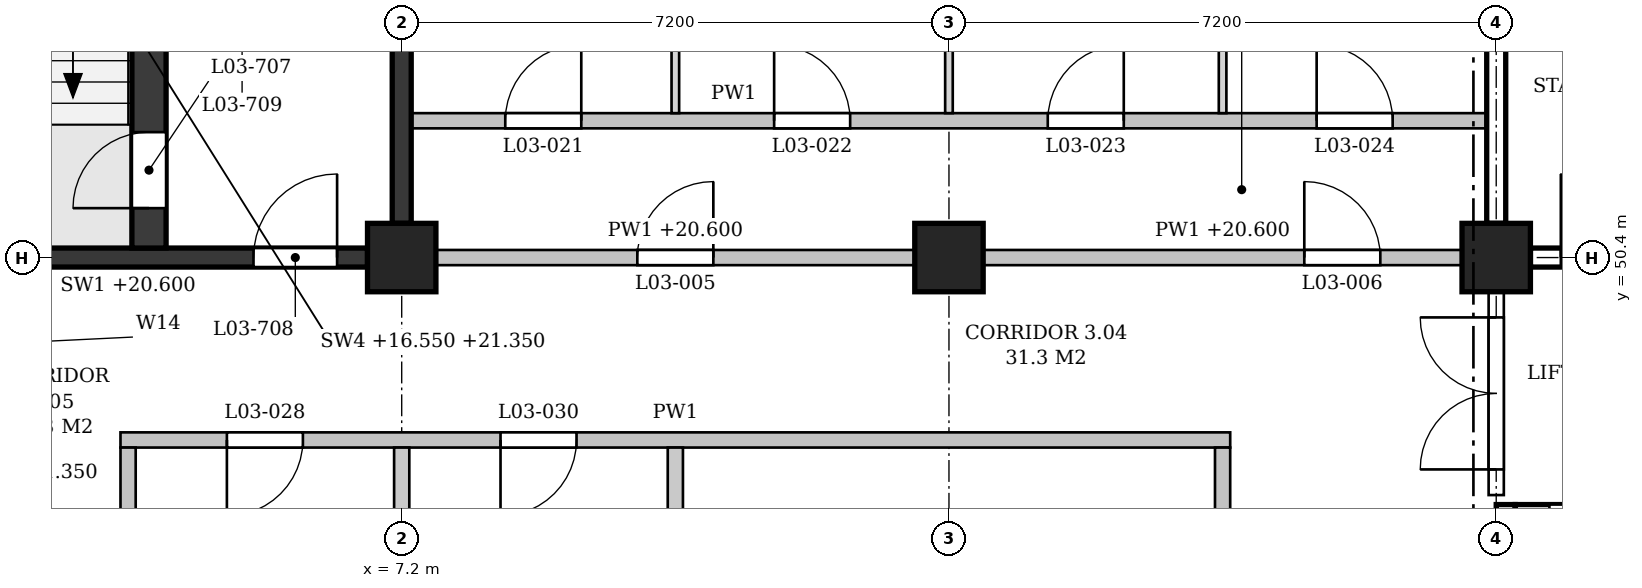
"""IFC4 building model, lengths in metres.
Left out: names, types, materials, properties, quantities, classifications, styles, units other than length and angle.
Written with IfcOpenShell. Run it as: python <this file> out.ifc"""

import sys

from ifc_helpers import new_model, si_unit, direction, frame, frame_2d, origin, origin_2d, place, context, subcontext, project, spatial, polyline, rectangle, outline, extrude, element, fill, save


model = new_model("IFC4")
c1 = context("Model", 3, precision=1e-05, world=origin(), true_north=direction((0.0, 1.0)))
c2 = subcontext(c1, "Body", "Model", "MODEL_VIEW")
j1 = project(units=[si_unit("LENGTHUNIT", "METRE"), si_unit("PLANEANGLEUNIT", "RADIAN")], contexts=[c1])
p1 = place(None, origin())
s1 = spatial("IfcSite", under=j1, at=p1, CompositionType="ELEMENT")
p2 = place(p1, origin())
s2 = spatial("IfcBuilding", under=s1, at=p2, CompositionType="ELEMENT")
p3 = place(p2, frame((0.0, 0.0, 16.8)))
s3 = spatial("IfcBuildingStorey", under=s2, at=p3, CompositionType="ELEMENT", Elevation=16.8)
for number, where, z_axis, x_axis in (
    (1, (7.2, 50.4, 0.0), (0.0, 0.0, 1.0), (1.0, 0.0, 0.0)),
    (2, (14.4, 50.4, 0.0), (0.0, 0.0, 1.0), (1.0, 0.0, 0.0)),
    (3, (21.6, 50.4, 0.0), (0.0, 0.0, 1.0), (1.0, 0.0, 0.0)),
):
    element("IfcColumn", number, at=place(p3, frame(where, z_axis=z_axis, x_axis=x_axis)), inside=s3, PredefinedType="COLUMN", context=c2, shape_type="SweptSolid", body=[
        extrude(rectangle(XDim=0.9, YDim=0.9, at=origin_2d()), origin(), (0.0, 0.0, 1.0), 4.8),
    ])
p4 = place(p3, frame((0.45, 50.4, 0.0), z_axis=(0.0, 0.0, 1.0), x_axis=(1.0, 0.0, 0.0)))
e4 = element("IfcWall", 4, at=p4, inside=s3, PredefinedType="SHEAR", context=c2, shape_type="SweptSolid", body=[
    extrude(rectangle(XDim=6.3, YDim=0.25, at=frame_2d((3.15, 0.0))), origin(), (0.0, 0.0, 1.0), 3.8),
])
p5 = place(p4, frame((4.8, 0.0, 0.0)))
e5 = element("IfcOpeningElement", 5, at=p5, cuts=e4, PredefinedType="OPENING", context=c2, shape_type="SweptSolid", body=[
    extrude(rectangle(XDim=1.1, YDim=2.1, at=frame_2d((0.55, 1.05))), frame((0.0, 0.135, 0.0), z_axis=(0.0, -1.0, 0.0), x_axis=(1.0, 0.0, 0.0)), (0.0, 0.0, 1.0), 0.27),
])
p6 = place(p3, frame((7.2, 50.85, 0.0), z_axis=(0.0, 0.0, 1.0), x_axis=(0.0, 1.0, 0.0)))
e6 = element("IfcWall", 6, at=p6, inside=s3, PredefinedType="SHEAR", context=c2, shape_type="SweptSolid", body=[
    extrude(rectangle(XDim=6.3, YDim=0.25, at=frame_2d((3.15, 0.0))), origin(), (0.0, 0.0, 1.0), 3.8),
])
p7 = place(p3, frame((3.875, 50.525, 0.0), z_axis=(0.0, 0.0, 1.0), x_axis=(0.0, 1.0, 0.0)))
e7 = element("IfcWall", 7, at=p7, inside=s3, PredefinedType="SHEAR", context=c2, shape_type="SweptSolid", body=[
    extrude(rectangle(XDim=6.85, YDim=0.45, at=frame_2d((3.425, 0.0))), origin(), (0.0, 0.0, 1.0), 4.55),
])
p8 = place(p7, frame((0.525, 0.0, 0.0)))
e8 = element("IfcOpeningElement", 8, at=p8, cuts=e7, PredefinedType="OPENING", context=c2, shape_type="SweptSolid", body=[
    extrude(rectangle(XDim=1.0, YDim=2.1, at=frame_2d((0.5, 1.05))), frame((0.0, 0.235, 0.0), z_axis=(0.0, -1.0, 0.0), x_axis=(1.0, 0.0, 0.0)), (0.0, 0.0, 1.0), 0.47),
])
p9 = place(p3, frame((22.05, 50.4, 0.0), z_axis=(0.0, 0.0, 1.0), x_axis=(1.0, 0.0, 0.0)))
e9 = element("IfcWall", 9, at=p9, inside=s3, PredefinedType="SHEAR", context=c2, shape_type="SweptSolid", body=[
    extrude(rectangle(XDim=6.3, YDim=0.25, at=frame_2d((3.15, 0.0))), origin(), (0.0, 0.0, 1.0), 3.8),
])
p10 = place(p9, frame((0.4, 0.0, 0.0)))
e10 = element("IfcOpeningElement", 10, at=p10, cuts=e9, PredefinedType="OPENING", context=c2, shape_type="SweptSolid", body=[
    extrude(rectangle(XDim=1.1, YDim=2.1, at=frame_2d((0.55, 1.05))), frame((0.0, 0.135, 0.0), z_axis=(0.0, -1.0, 0.0), x_axis=(1.0, 0.0, 0.0)), (0.0, 0.0, 1.0), 0.27),
])
p11 = place(p3, frame((21.6, 50.85, 0.0), z_axis=(0.0, 0.0, 1.0), x_axis=(0.0, 1.0, 0.0)))
e11 = element("IfcWall", 11, at=p11, inside=s3, PredefinedType="SHEAR", context=c2, shape_type="SweptSolid", body=[
    extrude(rectangle(XDim=6.3, YDim=0.25, at=frame_2d((3.15, 0.0))), origin(), (0.0, 0.0, 1.0), 3.8),
])
p12 = place(p3, frame((21.725, 43.65, -0.25), z_axis=(0.0, 0.0, 1.0), x_axis=(0.0, 1.0, 0.0)))
e12 = element("IfcWall", 12, at=p12, inside=s3, PredefinedType="SHEAR", context=c2, shape_type="SweptSolid", body=[
    extrude(rectangle(XDim=3.5, YDim=0.25, at=frame_2d((1.75, 0.0))), origin(), (0.0, 0.0, 1.0), 4.05),
])
p13 = place(p3, frame((21.85, 47.025, -0.25), z_axis=(0.0, 0.0, 1.0), x_axis=(1.0, 0.0, 0.0)))
e13 = element("IfcWall", 13, at=p13, inside=s3, PredefinedType="SHEAR", context=c2, shape_type="SweptSolid", body=[
    extrude(rectangle(XDim=2.0, YDim=0.25, at=frame_2d((1.0, 0.0))), origin(), (0.0, 0.0, 1.0), 4.8),
])
p14 = place(p13, frame((0.45, 0.0, 0.25)))
e14 = element("IfcOpeningElement", 14, at=p14, cuts=e13, PredefinedType="OPENING", context=c2, shape_type="SweptSolid", body=[
    extrude(rectangle(XDim=1.1, YDim=2.1, at=frame_2d((0.55, 1.05))), frame((0.0, 0.135, 0.0), z_axis=(0.0, -1.0, 0.0), x_axis=(1.0, 0.0, 0.0)), (0.0, 0.0, 1.0), 0.27),
])
p15 = place(p3, frame((3.5, 48.0, 0.0), z_axis=(0.0, 0.0, 1.0), x_axis=(1.0, 0.0, 0.0)))
e15 = element("IfcWall", 15, at=p15, inside=s3, PredefinedType="PARTITIONING", context=c2, shape_type="SweptSolid", body=[
    extrude(outline(polyline([(0.0, 0.0), (14.6, 0.0), (14.6, 4.55), (11.15, 4.55), (11.15, 3.8), (10.65, 3.8), (10.65, 4.55), (3.95, 4.55), (3.95, 3.8), (3.45, 3.8), (3.45, 4.55), (0.0, 4.55), (0.0, 0.0)])), frame((0.0, 0.1, 0.0), z_axis=(0.0, -1.0, 0.0), x_axis=(1.0, 0.0, 0.0)), (0.0, 0.0, 1.0), 0.2),
])
p16 = place(p15, frame((1.4, 0.0, 0.0)))
e16 = element("IfcOpeningElement", 16, at=p16, cuts=e15, PredefinedType="OPENING", context=c2, shape_type="SweptSolid", body=[
    extrude(rectangle(XDim=1.0, YDim=2.1, at=frame_2d((0.5, 1.05))), frame((0.0, 0.11, 0.0), z_axis=(0.0, -1.0, 0.0), x_axis=(1.0, 0.0, 0.0)), (0.0, 0.0, 1.0), 0.22),
])
p17 = place(p15, frame((5.0, 0.0, 0.0)))
e17 = element("IfcOpeningElement", 17, at=p17, cuts=e15, PredefinedType="OPENING", context=c2, shape_type="SweptSolid", body=[
    extrude(rectangle(XDim=1.0, YDim=2.1, at=frame_2d((0.5, 1.05))), frame((0.0, 0.11, 0.0), z_axis=(0.0, -1.0, 0.0), x_axis=(1.0, 0.0, 0.0)), (0.0, 0.0, 1.0), 0.22),
])
p18 = place(p3, frame((7.65, 50.4, 0.0), z_axis=(0.0, 0.0, 1.0), x_axis=(1.0, 0.0, 0.0)))
e18 = element("IfcWall", 18, at=p18, inside=s3, PredefinedType="PARTITIONING", context=c2, shape_type="SweptSolid", body=[
    extrude(rectangle(XDim=6.3, YDim=0.2, at=frame_2d((3.15, 0.0))), origin(), (0.0, 0.0, 1.0), 3.8),
])
p19 = place(p18, frame((2.65, 0.0, 0.0)))
e19 = element("IfcOpeningElement", 19, at=p19, cuts=e18, PredefinedType="OPENING", context=c2, shape_type="SweptSolid", body=[
    extrude(rectangle(XDim=1.0, YDim=2.1, at=frame_2d((0.5, 1.05))), frame((0.0, 0.11, 0.0), z_axis=(0.0, -1.0, 0.0), x_axis=(1.0, 0.0, 0.0)), (0.0, 0.0, 1.0), 0.22),
])
p20 = place(p3, frame((14.85, 50.4, 0.0), z_axis=(0.0, 0.0, 1.0), x_axis=(1.0, 0.0, 0.0)))
e20 = element("IfcWall", 20, at=p20, inside=s3, PredefinedType="PARTITIONING", context=c2, shape_type="SweptSolid", body=[
    extrude(rectangle(XDim=6.3, YDim=0.2, at=frame_2d((3.15, 0.0))), origin(), (0.0, 0.0, 1.0), 3.8),
])
p21 = place(p20, frame((4.225, 0.0, 0.0)))
e21 = element("IfcOpeningElement", 21, at=p21, cuts=e20, PredefinedType="OPENING", context=c2, shape_type="SweptSolid", body=[
    extrude(rectangle(XDim=1.0, YDim=2.1, at=frame_2d((0.5, 1.05))), frame((0.0, 0.11, 0.0), z_axis=(0.0, -1.0, 0.0), x_axis=(1.0, 0.0, 0.0)), (0.0, 0.0, 1.0), 0.22),
])
p22 = place(p3, frame((7.325, 52.2, 0.0), z_axis=(0.0, 0.0, 1.0), x_axis=(1.0, 0.0, 0.0)))
e22 = element("IfcWall", 22, at=p22, inside=s3, PredefinedType="PARTITIONING", context=c2, shape_type="SweptSolid", body=[
    extrude(outline(polyline([(0.0, 0.0), (14.15, 0.0), (14.15, 3.8), (14.025, 3.8), (14.025, 4.55), (7.325, 4.55), (7.325, 3.8), (6.825, 3.8), (6.825, 4.55), (0.125, 4.55), (0.125, 3.8), (0.0, 3.8), (0.0, 0.0)])), frame((0.0, 0.1, 0.0), z_axis=(0.0, -1.0, 0.0), x_axis=(1.0, 0.0, 0.0)), (0.0, 0.0, 1.0), 0.2),
])
p23 = place(p22, frame((1.238, 0.0, 0.0)))
e23 = element("IfcOpeningElement", 23, at=p23, cuts=e22, PredefinedType="OPENING", context=c2, shape_type="SweptSolid", body=[
    extrude(rectangle(XDim=1.0, YDim=2.1, at=frame_2d((0.5, 1.05))), frame((0.0, 0.11, 0.0), z_axis=(0.0, -1.0, 0.0), x_axis=(1.0, 0.0, 0.0)), (0.0, 0.0, 1.0), 0.22),
])
p24 = place(p22, frame((4.775, 0.0, 0.0)))
e24 = element("IfcOpeningElement", 24, at=p24, cuts=e22, PredefinedType="OPENING", context=c2, shape_type="SweptSolid", body=[
    extrude(rectangle(XDim=1.0, YDim=2.1, at=frame_2d((0.5, 1.05))), frame((0.0, 0.11, 0.0), z_axis=(0.0, -1.0, 0.0), x_axis=(1.0, 0.0, 0.0)), (0.0, 0.0, 1.0), 0.22),
])
p25 = place(p22, frame((8.375, 0.0, 0.0)))
e25 = element("IfcOpeningElement", 25, at=p25, cuts=e22, PredefinedType="OPENING", context=c2, shape_type="SweptSolid", body=[
    extrude(rectangle(XDim=1.0, YDim=2.1, at=frame_2d((0.5, 1.05))), frame((0.0, 0.11, 0.0), z_axis=(0.0, -1.0, 0.0), x_axis=(1.0, 0.0, 0.0)), (0.0, 0.0, 1.0), 0.22),
])
p26 = place(p22, frame((11.913, 0.0, 0.0)))
e26 = element("IfcOpeningElement", 26, at=p26, cuts=e22, PredefinedType="OPENING", context=c2, shape_type="SweptSolid", body=[
    extrude(rectangle(XDim=1.0, YDim=2.1, at=frame_2d((0.5, 1.05))), frame((0.0, 0.11, 0.0), z_axis=(0.0, -1.0, 0.0), x_axis=(1.0, 0.0, 0.0)), (0.0, 0.0, 1.0), 0.22),
])
p27 = place(p3, frame((3.6, 46.8, 0.0), z_axis=(0.0, 0.0, 1.0), x_axis=(0.0, 1.0, 0.0)))
e27 = element("IfcWall", 27, at=p27, inside=s3, PredefinedType="PARTITIONING", context=c2, shape_type="SweptSolid", body=[
    extrude(rectangle(XDim=1.1, YDim=0.2, at=frame_2d((0.55, 0.0))), origin(), (0.0, 0.0, 1.0), 4.55),
])
p28 = place(p3, frame((7.2, 43.65, 0.0), z_axis=(0.0, 0.0, 1.0), x_axis=(0.0, 1.0, 0.0)))
e28 = element("IfcWall", 28, at=p28, inside=s3, PredefinedType="PARTITIONING", context=c2, shape_type="SweptSolid", body=[
    extrude(rectangle(XDim=4.25, YDim=0.2, at=frame_2d((2.125, 0.0))), origin(), (0.0, 0.0, 1.0), 3.8),
])
p29 = place(p3, frame((10.8, 36.15, 0.0), z_axis=(0.0, 0.0, 1.0), x_axis=(0.0, 1.0, 0.0)))
e29 = element("IfcWall", 29, at=p29, inside=s3, PredefinedType="PARTITIONING", context=c2, shape_type="SweptSolid", body=[
    extrude(outline(polyline([(0.0, 0.0), (11.75, 0.0), (11.75, 4.55), (7.3, 4.55), (7.3, 3.8), (6.8, 3.8), (6.8, 4.55), (0.1, 4.55), (0.1, 3.95), (0.0, 3.95), (0.0, 0.0)])), frame((0.0, 0.1, 0.0), z_axis=(0.0, -1.0, 0.0), x_axis=(1.0, 0.0, 0.0)), (0.0, 0.0, 1.0), 0.2),
])
p30 = place(p3, frame((10.8, 52.3, 0.0), z_axis=(0.0, 0.0, 1.0), x_axis=(0.0, 1.0, 0.0)))
e30 = element("IfcWall", 30, at=p30, inside=s3, PredefinedType="PARTITIONING", context=c2, shape_type="SweptSolid", body=[
    extrude(rectangle(XDim=5.15, YDim=0.1, at=frame_2d((2.575, 0.0))), origin(), (0.0, 0.0, 1.0), 3.8),
])
p31 = place(p3, frame((14.4, 52.3, 0.0), z_axis=(0.0, 0.0, 1.0), x_axis=(0.0, 1.0, 0.0)))
e31 = element("IfcWall", 31, at=p31, inside=s3, PredefinedType="PARTITIONING", context=c2, shape_type="SweptSolid", body=[
    extrude(rectangle(XDim=4.85, YDim=0.1, at=frame_2d((2.425, 0.0))), origin(), (0.0, 0.0, 1.0), 3.8),
])
p32 = place(p3, frame((18.0, 40.9, 0.0), z_axis=(0.0, 0.0, 1.0), x_axis=(0.0, 1.0, 0.0)))
e32 = element("IfcWall", 32, at=p32, inside=s3, PredefinedType="PARTITIONING", context=c2, shape_type="SweptSolid", body=[
    extrude(outline(polyline([(0.0, 0.0), (7.0, 0.0), (7.0, 4.55), (2.55, 4.55), (2.55, 3.8), (2.05, 3.8), (2.05, 4.55), (0.0, 4.55), (0.0, 0.0)])), frame((0.0, 0.1, 0.0), z_axis=(0.0, -1.0, 0.0), x_axis=(1.0, 0.0, 0.0)), (0.0, 0.0, 1.0), 0.2),
])
p33 = place(p32, frame((3.0, 0.0, 0.0)))
e33 = element("IfcOpeningElement", 33, at=p33, cuts=e32, PredefinedType="OPENING", context=c2, shape_type="SweptSolid", body=[
    extrude(rectangle(XDim=1.0, YDim=2.1, at=frame_2d((0.5, 1.05))), frame((0.0, 0.11, 0.0), z_axis=(0.0, -1.0, 0.0), x_axis=(1.0, 0.0, 0.0)), (0.0, 0.0, 1.0), 0.22),
])
p34 = place(p3, frame((18.0, 52.3, 0.0), z_axis=(0.0, 0.0, 1.0), x_axis=(0.0, 1.0, 0.0)))
e34 = element("IfcWall", 34, at=p34, inside=s3, PredefinedType="PARTITIONING", context=c2, shape_type="SweptSolid", body=[
    extrude(rectangle(XDim=5.15, YDim=0.1, at=frame_2d((2.575, 0.0))), origin(), (0.0, 0.0, 1.0), 3.8),
])
p35 = place(p3, frame((21.6, 47.275, 0.0), z_axis=(0.0, 0.0, 1.0), x_axis=(0.0, 1.0, 0.0)))
e35 = element("IfcWall", 35, at=p35, inside=s3, PredefinedType="PARTITIONING", context=c2, shape_type="SweptSolid", body=[
    extrude(rectangle(XDim=2.675, YDim=0.2, at=frame_2d((1.337, 0.0))), origin(), (0.0, 0.0, 1.0), 3.8),
])
p36 = place(p35, frame((0.337, 0.0, 0.0)))
e36 = element("IfcOpeningElement", 36, at=p36, cuts=e35, PredefinedType="OPENING", context=c2, shape_type="SweptSolid", body=[
    extrude(rectangle(XDim=2.0, YDim=2.4, at=frame_2d((1.0, 1.2))), frame((0.0, 0.11, 0.0), z_axis=(0.0, -1.0, 0.0), x_axis=(1.0, 0.0, 0.0)), (0.0, 0.0, 1.0), 0.22),
])
p37 = place(p8, origin())
e37 = element("IfcDoor", 37, at=p37, inside=s3, OperationType="SINGLE_SWING_LEFT", PredefinedType="DOOR", context=c2, shape_type="SweptSolid", body=[
    extrude(rectangle(XDim=1.0, YDim=2.1, at=frame_2d((0.5, 1.05))), frame((0.0, 0.025, 0.0), z_axis=(0.0, -1.0, 0.0), x_axis=(1.0, 0.0, 0.0)), (0.0, 0.0, 1.0), 0.05),
])
fill(e8, e37)
p38 = place(p5, origin())
e38 = element("IfcDoor", 38, at=p38, inside=s3, OperationType="SINGLE_SWING_RIGHT", PredefinedType="DOOR", context=c2, shape_type="SweptSolid", body=[
    extrude(rectangle(XDim=1.1, YDim=2.1, at=frame_2d((0.55, 1.05))), frame((0.0, 0.025, 0.0), z_axis=(0.0, -1.0, 0.0), x_axis=(1.0, 0.0, 0.0)), (0.0, 0.0, 1.0), 0.05),
])
fill(e5, e38)
p39 = place(p10, origin())
e39 = element("IfcDoor", 39, at=p39, inside=s3, OperationType="SINGLE_SWING_LEFT", PredefinedType="DOOR", context=c2, shape_type="SweptSolid", body=[
    extrude(rectangle(XDim=1.1, YDim=2.1, at=frame_2d((0.55, 1.05))), frame((0.0, 0.025, 0.0), z_axis=(0.0, -1.0, 0.0), x_axis=(1.0, 0.0, 0.0)), (0.0, 0.0, 1.0), 0.05),
])
fill(e10, e39)
p40 = place(p36, origin())
e40 = element("IfcDoor", 40, at=p40, inside=s3, OperationType="DOUBLE_DOOR_SINGLE_SWING", PredefinedType="DOOR", context=c2, shape_type="SweptSolid", body=[
    extrude(rectangle(XDim=2.0, YDim=2.4, at=frame_2d((1.0, 1.2))), frame((0.0, 0.025, 0.0), z_axis=(0.0, -1.0, 0.0), x_axis=(1.0, 0.0, 0.0)), (0.0, 0.0, 1.0), 0.05),
])
fill(e36, e40)
p41 = place(p19, origin())
e41 = element("IfcDoor", 41, at=p41, inside=s3, OperationType="SINGLE_SWING_RIGHT", PredefinedType="DOOR", context=c2, shape_type="SweptSolid", body=[
    extrude(rectangle(XDim=1.0, YDim=2.1, at=frame_2d((0.5, 1.05))), frame((0.0, 0.025, 0.0), z_axis=(0.0, -1.0, 0.0), x_axis=(1.0, 0.0, 0.0)), (0.0, 0.0, 1.0), 0.05),
])
fill(e19, e41)
p42 = place(p21, origin())
e42 = element("IfcDoor", 42, at=p42, inside=s3, OperationType="SINGLE_SWING_LEFT", PredefinedType="DOOR", context=c2, shape_type="SweptSolid", body=[
    extrude(rectangle(XDim=1.0, YDim=2.1, at=frame_2d((0.5, 1.05))), frame((0.0, 0.025, 0.0), z_axis=(0.0, -1.0, 0.0), x_axis=(1.0, 0.0, 0.0)), (0.0, 0.0, 1.0), 0.05),
])
fill(e21, e42)
p43 = place(p23, origin())
e43 = element("IfcDoor", 43, at=p43, inside=s3, OperationType="SINGLE_SWING_RIGHT", PredefinedType="DOOR", context=c2, shape_type="SweptSolid", body=[
    extrude(rectangle(XDim=1.0, YDim=2.1, at=frame_2d((0.5, 1.05))), frame((0.0, 0.025, 0.0), z_axis=(0.0, -1.0, 0.0), x_axis=(1.0, 0.0, 0.0)), (0.0, 0.0, 1.0), 0.05),
])
fill(e23, e43)
p44 = place(p24, origin())
e44 = element("IfcDoor", 44, at=p44, inside=s3, OperationType="SINGLE_SWING_LEFT", PredefinedType="DOOR", context=c2, shape_type="SweptSolid", body=[
    extrude(rectangle(XDim=1.0, YDim=2.1, at=frame_2d((0.5, 1.05))), frame((0.0, 0.025, 0.0), z_axis=(0.0, -1.0, 0.0), x_axis=(1.0, 0.0, 0.0)), (0.0, 0.0, 1.0), 0.05),
])
fill(e24, e44)
p45 = place(p25, origin())
e45 = element("IfcDoor", 45, at=p45, inside=s3, OperationType="SINGLE_SWING_RIGHT", PredefinedType="DOOR", context=c2, shape_type="SweptSolid", body=[
    extrude(rectangle(XDim=1.0, YDim=2.1, at=frame_2d((0.5, 1.05))), frame((0.0, 0.025, 0.0), z_axis=(0.0, -1.0, 0.0), x_axis=(1.0, 0.0, 0.0)), (0.0, 0.0, 1.0), 0.05),
])
fill(e25, e45)
p46 = place(p26, origin())
e46 = element("IfcDoor", 46, at=p46, inside=s3, OperationType="SINGLE_SWING_LEFT", PredefinedType="DOOR", context=c2, shape_type="SweptSolid", body=[
    extrude(rectangle(XDim=1.0, YDim=2.1, at=frame_2d((0.5, 1.05))), frame((0.0, 0.025, 0.0), z_axis=(0.0, -1.0, 0.0), x_axis=(1.0, 0.0, 0.0)), (0.0, 0.0, 1.0), 0.05),
])
fill(e26, e46)
p47 = place(p16, frame((1.0, 0.0, 0.0), z_axis=(0.0, 0.0, 1.0), x_axis=(-1.0, 0.0, 0.0)))
e47 = element("IfcDoor", 47, at=p47, inside=s3, OperationType="SINGLE_SWING_RIGHT", PredefinedType="DOOR", context=c2, shape_type="SweptSolid", body=[
    extrude(rectangle(XDim=1.0, YDim=2.1, at=frame_2d((0.5, 1.05))), frame((0.0, 0.025, 0.0), z_axis=(0.0, -1.0, 0.0), x_axis=(1.0, 0.0, 0.0)), (0.0, 0.0, 1.0), 0.05),
])
fill(e16, e47)
p48 = place(p17, frame((1.0, 0.0, 0.0), z_axis=(0.0, 0.0, 1.0), x_axis=(-1.0, 0.0, 0.0)))
e48 = element("IfcDoor", 48, at=p48, inside=s3, OperationType="SINGLE_SWING_RIGHT", PredefinedType="DOOR", context=c2, shape_type="SweptSolid", body=[
    extrude(rectangle(XDim=1.0, YDim=2.1, at=frame_2d((0.5, 1.05))), frame((0.0, 0.025, 0.0), z_axis=(0.0, -1.0, 0.0), x_axis=(1.0, 0.0, 0.0)), (0.0, 0.0, 1.0), 0.05),
])
fill(e17, e48)
save(model, sys.argv[1])
